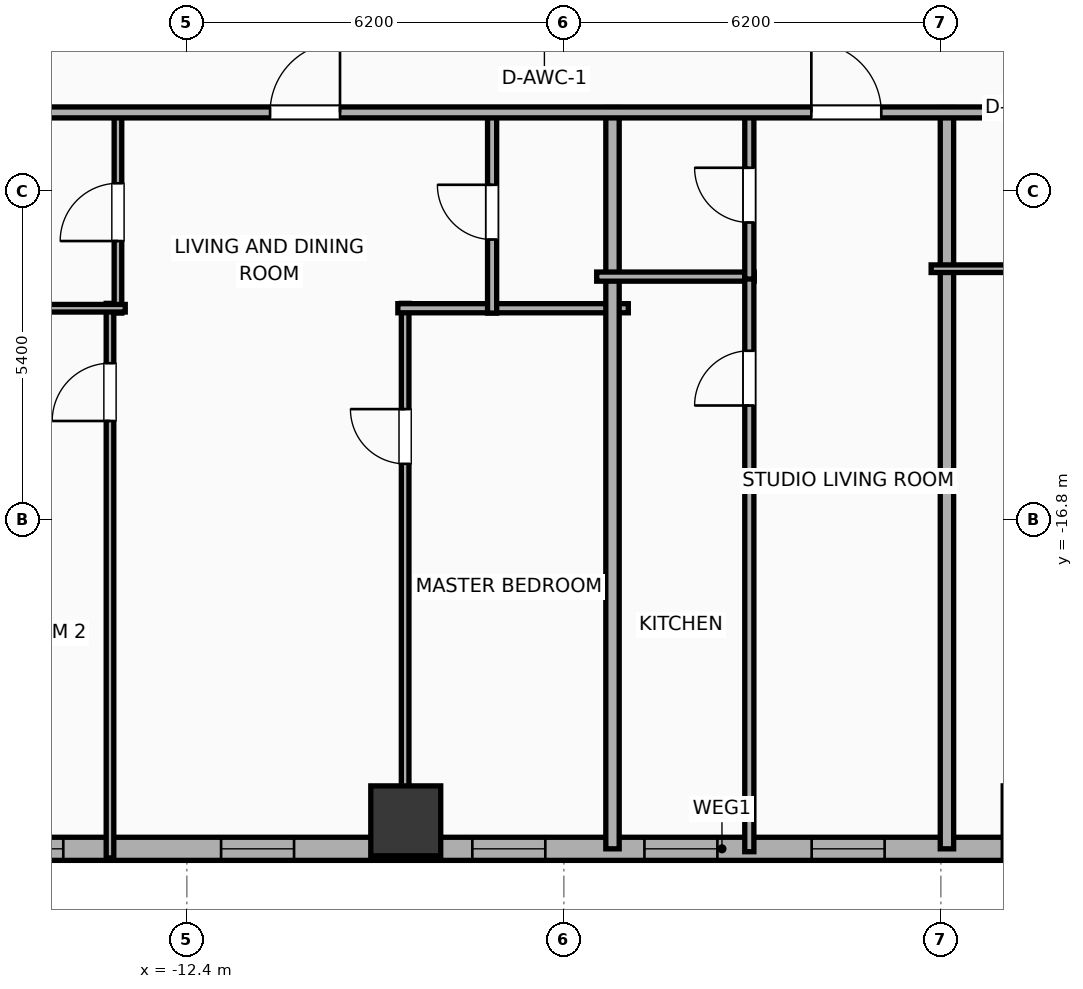
"""IFC4 building model, lengths in metres.
Left out: names, types, materials, properties, quantities, classifications, styles, units other than length and angle.
Written with IfcOpenShell. Run it as: python <this file> out.ifc"""

import sys

from ifc_helpers import new_model, si_unit, direction, frame, frame_2d, origin, origin_2d, place, context, subcontext, project, spatial, rectangle, hollow_rectangle, extrude, element, fill, save


model = new_model("IFC4")
c1 = context("Model", 3, precision=1e-05, world=origin(), true_north=direction((0.0, 1.0)))
c2 = subcontext(c1, "Body", "Model", "MODEL_VIEW")
j1 = project(units=[si_unit("LENGTHUNIT", "METRE"), si_unit("PLANEANGLEUNIT", "RADIAN")], contexts=[c1])
p1 = place(None, origin())
s1 = spatial("IfcSite", under=j1, at=p1, CompositionType="ELEMENT")
p2 = place(p1, origin())
s2 = spatial("IfcBuilding", under=s1, at=p2, CompositionType="ELEMENT")
p3 = place(p2, frame((0.0, 0.0, 37.7)))
s3 = spatial("IfcBuildingStorey", under=s2, at=p3, CompositionType="ELEMENT", Elevation=37.7)
for number, where, z_axis, x_axis in (
    (1, (-8.8, -21.75, 0.0), (0.0, 0.0, 1.0), (1.0, 0.0, 0.0)),
    (2, (1.6, -21.75, 0.0), (0.0, 0.0, 1.0), (1.0, 0.0, 0.0)),
):
    element("IfcColumn", number, at=place(p3, frame(where, z_axis=z_axis, x_axis=x_axis)), inside=s3, PredefinedType="COLUMN", context=c2, shape_type="SweptSolid", body=[
        extrude(hollow_rectangle(XDim=1.15, YDim=1.15, WallThickness=0.04, at=origin_2d()), origin(), (0.0, 0.0, 1.0), 3.9),
    ])
p4 = place(p3, frame((22.381, -22.21, 0.0), z_axis=(0.0, 0.0, 1.0), x_axis=(-1.0, 0.0, 0.0)))
e3 = element("IfcWall", 3, at=p4, inside=s3, PredefinedType="ELEMENTEDWALL", context=c2, shape_type="SweptSolid", body=[
    extrude(rectangle(XDim=51.963, YDim=0.38, at=frame_2d((25.981, 0.0))), origin(), (0.0, 0.0, 1.0), 3.65),
])
p5 = place(p4, frame((42.952, 0.0, 0.75)))
e4 = element("IfcOpeningElement", 4, at=p5, cuts=e3, PredefinedType="OPENING", context=c2, shape_type="SweptSolid", body=[
    extrude(rectangle(XDim=2.4, YDim=2.1, at=frame_2d((1.2, 1.05))), frame((0.0, 0.2, 0.0), z_axis=(0.0, -1.0, 0.0), x_axis=(1.0, 0.0, 0.0)), (0.0, 0.0, 1.0), 0.4),
])
p6 = place(p4, frame((49.847, 0.0, 0.75)))
e5 = element("IfcOpeningElement", 5, at=p6, cuts=e3, PredefinedType="OPENING", context=c2, shape_type="SweptSolid", body=[
    extrude(rectangle(XDim=1.2, YDim=2.05, at=frame_2d((0.6, 1.025))), frame((0.0, 0.2, 0.0), z_axis=(0.0, -1.0, 0.0), x_axis=(1.0, 0.0, 0.0)), (0.0, 0.0, 1.0), 0.4),
])
p7 = place(p4, frame((47.445, 0.0, 0.75)))
e6 = element("IfcOpeningElement", 6, at=p7, cuts=e3, PredefinedType="OPENING", context=c2, shape_type="SweptSolid", body=[
    extrude(rectangle(XDim=1.2, YDim=2.05, at=frame_2d((0.6, 1.025))), frame((0.0, 0.2, 0.0), z_axis=(0.0, -1.0, 0.0), x_axis=(1.0, 0.0, 0.0)), (0.0, 0.0, 1.0), 0.4),
])
p8 = place(p4, frame((39.526, 0.0, 0.75)))
e7 = element("IfcOpeningElement", 7, at=p8, cuts=e3, PredefinedType="OPENING", context=c2, shape_type="SweptSolid", body=[
    extrude(rectangle(XDim=1.2, YDim=2.05, at=frame_2d((0.6, 1.025))), frame((0.0, 0.2, 0.0), z_axis=(0.0, -1.0, 0.0), x_axis=(1.0, 0.0, 0.0)), (0.0, 0.0, 1.0), 0.4),
])
p9 = place(p4, frame((33.018, 0.0, 0.75)))
e8 = element("IfcOpeningElement", 8, at=p9, cuts=e3, PredefinedType="OPENING", context=c2, shape_type="SweptSolid", body=[
    extrude(rectangle(XDim=1.2, YDim=2.05, at=frame_2d((0.6, 1.025))), frame((0.0, 0.2, 0.0), z_axis=(0.0, -1.0, 0.0), x_axis=(1.0, 0.0, 0.0)), (0.0, 0.0, 1.0), 0.4),
])
p10 = place(p4, frame((36.813, 0.0, 0.75)))
e9 = element("IfcOpeningElement", 9, at=p10, cuts=e3, PredefinedType="OPENING", context=c2, shape_type="SweptSolid", body=[
    extrude(rectangle(XDim=1.2, YDim=2.05, at=frame_2d((0.6, 1.025))), frame((0.0, 0.2, 0.0), z_axis=(0.0, -1.0, 0.0), x_axis=(1.0, 0.0, 0.0)), (0.0, 0.0, 1.0), 0.4),
])
p11 = place(p4, frame((28.886, 0.0, 0.75)))
e10 = element("IfcOpeningElement", 10, at=p11, cuts=e3, PredefinedType="OPENING", context=c2, shape_type="SweptSolid", body=[
    extrude(rectangle(XDim=1.2, YDim=2.05, at=frame_2d((0.6, 1.025))), frame((0.0, 0.2, 0.0), z_axis=(0.0, -1.0, 0.0), x_axis=(1.0, 0.0, 0.0)), (0.0, 0.0, 1.0), 0.4),
])
p12 = place(p4, frame((23.306, 0.0, 0.75)))
e11 = element("IfcOpeningElement", 11, at=p12, cuts=e3, PredefinedType="OPENING", context=c2, shape_type="SweptSolid", body=[
    extrude(rectangle(XDim=1.2, YDim=2.05, at=frame_2d((0.6, 1.025))), frame((0.0, 0.2, 0.0), z_axis=(0.0, -1.0, 0.0), x_axis=(1.0, 0.0, 0.0)), (0.0, 0.0, 1.0), 0.4),
])
p13 = place(p4, frame((26.056, 0.0, 0.75)))
e12 = element("IfcOpeningElement", 12, at=p13, cuts=e3, PredefinedType="OPENING", context=c2, shape_type="SweptSolid", body=[
    extrude(rectangle(XDim=1.2, YDim=2.05, at=frame_2d((0.6, 1.025))), frame((0.0, 0.2, 0.0), z_axis=(0.0, -1.0, 0.0), x_axis=(1.0, 0.0, 0.0)), (0.0, 0.0, 1.0), 0.4),
])
p14 = place(p4, frame((18.811, 0.0, 0.75)))
e13 = element("IfcOpeningElement", 13, at=p14, cuts=e3, PredefinedType="OPENING", context=c2, shape_type="SweptSolid", body=[
    extrude(rectangle(XDim=1.2, YDim=2.05, at=frame_2d((0.6, 1.025))), frame((0.0, 0.2, 0.0), z_axis=(0.0, -1.0, 0.0), x_axis=(1.0, 0.0, 0.0)), (0.0, 0.0, 1.0), 0.4),
])
p15 = place(p4, frame((14.602, 0.0, 0.75)))
e14 = element("IfcOpeningElement", 14, at=p15, cuts=e3, PredefinedType="OPENING", context=c2, shape_type="SweptSolid", body=[
    extrude(rectangle(XDim=1.2, YDim=2.05, at=frame_2d((0.6, 1.025))), frame((0.0, 0.2, 0.0), z_axis=(0.0, -1.0, 0.0), x_axis=(1.0, 0.0, 0.0)), (0.0, 0.0, 1.0), 0.4),
])
p16 = place(p4, frame((11.852, 0.0, 0.75)))
e15 = element("IfcOpeningElement", 15, at=p16, cuts=e3, PredefinedType="OPENING", context=c2, shape_type="SweptSolid", body=[
    extrude(rectangle(XDim=1.2, YDim=2.05, at=frame_2d((0.6, 1.025))), frame((0.0, 0.2, 0.0), z_axis=(0.0, -1.0, 0.0), x_axis=(1.0, 0.0, 0.0)), (0.0, 0.0, 1.0), 0.4),
])
p17 = place(p4, frame((8.316, 0.0, 0.75)))
e16 = element("IfcOpeningElement", 16, at=p17, cuts=e3, PredefinedType="OPENING", context=c2, shape_type="SweptSolid", body=[
    extrude(rectangle(XDim=1.2, YDim=2.05, at=frame_2d((0.6, 1.025))), frame((0.0, 0.2, 0.0), z_axis=(0.0, -1.0, 0.0), x_axis=(1.0, 0.0, 0.0)), (0.0, 0.0, 1.0), 0.4),
])
p18 = place(p4, frame((6.286, 0.0, 0.75)))
e17 = element("IfcOpeningElement", 17, at=p18, cuts=e3, PredefinedType="OPENING", context=c2, shape_type="SweptSolid", body=[
    extrude(rectangle(XDim=1.2, YDim=2.05, at=frame_2d((0.6, 1.025))), frame((0.0, 0.2, 0.0), z_axis=(0.0, -1.0, 0.0), x_axis=(1.0, 0.0, 0.0)), (0.0, 0.0, 1.0), 0.4),
])
p19 = place(p4, frame((3.737, 0.0, 0.75)))
e18 = element("IfcOpeningElement", 18, at=p19, cuts=e3, PredefinedType="OPENING", context=c2, shape_type="SweptSolid", body=[
    extrude(rectangle(XDim=1.2, YDim=2.05, at=frame_2d((0.6, 1.025))), frame((0.0, 0.2, 0.0), z_axis=(0.0, -1.0, 0.0), x_axis=(1.0, 0.0, 0.0)), (0.0, 0.0, 1.0), 0.4),
])
p20 = place(p4, frame((1.291, 0.0, 0.75)))
e19 = element("IfcOpeningElement", 19, at=p20, cuts=e3, PredefinedType="OPENING", context=c2, shape_type="SweptSolid", body=[
    extrude(rectangle(XDim=1.2, YDim=2.05, at=frame_2d((0.6, 1.025))), frame((0.0, 0.2, 0.0), z_axis=(0.0, -1.0, 0.0), x_axis=(1.0, 0.0, 0.0)), (0.0, 0.0, 1.0), 0.4),
])
p21 = place(p3, frame((-13.664, -22.36, 0.0), z_axis=(0.0, 0.0, 1.0), x_axis=(0.0, 1.0, 0.0)))
e20 = element("IfcWall", 20, at=p21, inside=s3, PredefinedType="PARTITIONING", context=c2, shape_type="SweptSolid", body=[
    extrude(rectangle(XDim=9.12, YDim=0.125, at=frame_2d((4.56, 0.0))), origin(), (0.0, 0.0, 1.0), 3.65),
])
p22 = place(p21, frame((7.186, 0.0, 0.0)))
e21 = element("IfcOpeningElement", 21, at=p22, cuts=e20, PredefinedType="OPENING", context=c2, shape_type="SweptSolid", body=[
    extrude(rectangle(XDim=0.95, YDim=2.05, at=frame_2d((0.475, 1.025))), frame((0.0, 0.073, 0.0), z_axis=(0.0, -1.0, 0.0), x_axis=(1.0, 0.0, 0.0)), (0.0, 0.0, 1.0), 0.145),
])
p23 = place(p3, frame((-8.81, -22.36, 0.0), z_axis=(0.0, 0.0, 1.0), x_axis=(0.0, 1.0, 0.0)))
e22 = element("IfcWall", 22, at=p23, inside=s3, PredefinedType="PARTITIONING", context=c2, shape_type="SweptSolid", body=[
    extrude(rectangle(XDim=9.12, YDim=0.125, at=frame_2d((4.56, 0.0))), origin(), (0.0, 0.0, 1.0), 2.94),
])
p24 = place(p23, frame((6.481, 0.0, 0.0)))
e23 = element("IfcOpeningElement", 23, at=p24, cuts=e22, PredefinedType="OPENING", context=c2, shape_type="SweptSolid", body=[
    extrude(rectangle(XDim=0.9, YDim=2.05, at=frame_2d((0.45, 1.025))), frame((0.0, 0.073, 0.0), z_axis=(0.0, -1.0, 0.0), x_axis=(1.0, 0.0, 0.0)), (0.0, 0.0, 1.0), 0.145),
])
p25 = place(p3, frame((-8.93, -13.32, 0.0), z_axis=(0.0, 0.0, 1.0), x_axis=(1.0, 0.0, 0.0)))
e24 = element("IfcWall", 24, at=p25, inside=s3, PredefinedType="PLUMBINGWALL", context=c2, shape_type="SweptSolid", body=[
    extrude(rectangle(XDim=3.79, YDim=0.15, at=frame_2d((1.895, 0.0))), origin(), (0.0, 0.0, 1.0), 3.65),
])
p26 = place(p3, frame((-13.533, -13.4, 0.0), z_axis=(0.0, 0.0, 1.0), x_axis=(0.0, 1.0, 0.0)))
e25 = element("IfcWall", 25, at=p26, inside=s3, PredefinedType="PARTITIONING", context=c2, shape_type="SweptSolid", body=[
    extrude(rectangle(XDim=3.32, YDim=0.125, at=frame_2d((1.66, 0.0))), origin(), (0.0, 0.0, 1.0), 3.65),
])
p27 = place(p26, frame((1.185, 0.0, 0.0)))
e26 = element("IfcOpeningElement", 26, at=p27, cuts=e25, PredefinedType="OPENING", context=c2, shape_type="SweptSolid", body=[
    extrude(rectangle(XDim=0.95, YDim=2.05, at=frame_2d((0.475, 1.025))), frame((0.0, 0.073, 0.0), z_axis=(0.0, -1.0, 0.0), x_axis=(1.0, 0.0, 0.0)), (0.0, 0.0, 1.0), 0.145),
])
p28 = place(p3, frame((-16.475, -13.32, 0.0), z_axis=(0.0, 0.0, 1.0), x_axis=(1.0, 0.0, 0.0)))
e27 = element("IfcWall", 27, at=p28, inside=s3, PredefinedType="PARTITIONING", context=c2, shape_type="SweptSolid", body=[
    extrude(rectangle(XDim=3.062, YDim=0.125, at=frame_2d((1.531, 0.0))), origin(), (0.0, 0.0, 1.0), 3.65),
])
p29 = place(p3, frame((-7.38, -13.4, 0.0), z_axis=(0.0, 0.0, 1.0), x_axis=(0.0, 1.0, 0.0)))
e28 = element("IfcWall", 28, at=p29, inside=s3, PredefinedType="PLUMBINGWALL", context=c2, shape_type="SweptSolid", body=[
    extrude(rectangle(XDim=3.32, YDim=0.15, at=frame_2d((1.66, 0.0))), origin(), (0.0, 0.0, 1.0), 3.65),
])
p30 = place(p29, frame((1.21, 0.0, 0.0)))
e29 = element("IfcOpeningElement", 29, at=p30, cuts=e28, PredefinedType="OPENING", context=c2, shape_type="SweptSolid", body=[
    extrude(rectangle(XDim=0.9, YDim=2.05, at=frame_2d((0.45, 1.025))), frame((0.0, 0.085, 0.0), z_axis=(0.0, -1.0, 0.0), x_axis=(1.0, 0.0, 0.0)), (0.0, 0.0, 1.0), 0.17),
])
p31 = place(p3, frame((-5.4, -22.21, 0.0), z_axis=(0.0, 0.0, 1.0), x_axis=(0.0, 1.0, 0.0)))
e30 = element("IfcWall", 30, at=p31, inside=s3, PredefinedType="PARTITIONING", context=c2, shape_type="SweptSolid", body=[
    extrude(rectangle(XDim=12.19, YDim=0.22, at=frame_2d((6.095, 0.0))), origin(), (0.0, 0.0, 1.0), 3.65),
])
p32 = place(p3, frame((-5.66, -12.8, 0.0), z_axis=(0.0, 0.0, 1.0), x_axis=(1.0, 0.0, 0.0)))
e31 = element("IfcWall", 31, at=p32, inside=s3, PredefinedType="PLUMBINGWALL", context=c2, shape_type="SweptSolid", body=[
    extrude(rectangle(XDim=2.59, YDim=0.15, at=frame_2d((1.295, 0.0))), origin(), (0.0, 0.0, 1.0), 3.65),
])
p33 = place(p3, frame((-3.15, -22.258, 0.0), z_axis=(0.0, 0.0, 1.0), x_axis=(0.0, 1.0, 0.0)))
e32 = element("IfcWall", 32, at=p33, inside=s3, PredefinedType="PLUMBINGWALL", context=c2, shape_type="SweptSolid", body=[
    extrude(rectangle(XDim=9.498, YDim=0.15, at=frame_2d((4.749, 0.0))), origin(), (0.0, 0.0, 1.0), 3.65),
])
p34 = place(p33, frame((7.338, 0.0, 0.0)))
e33 = element("IfcOpeningElement", 33, at=p34, cuts=e32, PredefinedType="OPENING", context=c2, shape_type="SweptSolid", body=[
    extrude(rectangle(XDim=0.9, YDim=2.05, at=frame_2d((0.45, 1.025))), frame((0.0, 0.085, 0.0), z_axis=(0.0, -1.0, 0.0), x_axis=(1.0, 0.0, 0.0)), (0.0, 0.0, 1.0), 0.17),
])
p35 = place(p3, frame((-3.15, -12.84, 0.0), z_axis=(0.0, 0.0, 1.0), x_axis=(0.0, 1.0, 0.0)))
e34 = element("IfcWall", 34, at=p35, inside=s3, PredefinedType="PLUMBINGWALL", context=c2, shape_type="SweptSolid", body=[
    extrude(rectangle(XDim=2.76, YDim=0.15, at=frame_2d((1.38, 0.0))), origin(), (0.0, 0.0, 1.0), 3.65),
])
p36 = place(p35, frame((0.93, 0.0, 0.0)))
e35 = element("IfcOpeningElement", 35, at=p36, cuts=e34, PredefinedType="OPENING", context=c2, shape_type="SweptSolid", body=[
    extrude(rectangle(XDim=0.9, YDim=2.05, at=frame_2d((0.45, 1.025))), frame((0.0, 0.085, 0.0), z_axis=(0.0, -1.0, 0.0), x_axis=(1.0, 0.0, 0.0)), (0.0, 0.0, 1.0), 0.17),
])
p37 = place(p3, frame((0.1, -22.21, 0.0), z_axis=(0.0, 0.0, 1.0), x_axis=(0.0, 1.0, 0.0)))
e36 = element("IfcWall", 36, at=p37, inside=s3, PredefinedType="PARTITIONING", context=c2, shape_type="SweptSolid", body=[
    extrude(rectangle(XDim=12.19, YDim=0.22, at=frame_2d((6.095, 0.0))), origin(), (0.0, 0.0, 1.0), 3.65),
])
p38 = place(p3, frame((-0.16, -12.67, 0.0), z_axis=(0.0, 0.0, 1.0), x_axis=(1.0, 0.0, 0.0)))
e37 = element("IfcWall", 37, at=p38, inside=s3, PredefinedType="PARTITIONING", context=c2, shape_type="SweptSolid", body=[
    extrude(rectangle(XDim=2.63, YDim=0.125, at=frame_2d((1.315, 0.0))), origin(), (0.0, 0.0, 1.0), 3.65),
])
p39 = place(p3, frame((-33.41, -10.1, 0.0), z_axis=(0.0, 0.0, 1.0), x_axis=(1.0, 0.0, 0.0)))
e38 = element("IfcWall", 38, at=p39, inside=s3, PredefinedType="PARTITIONING", context=c2, shape_type="SweptSolid", body=[
    extrude(rectangle(XDim=59.62, YDim=0.18, at=frame_2d((29.81, 0.0))), origin(), (0.0, 0.0, 1.0), 3.65),
])
p40 = place(p39, frame((2.746, 0.0, 0.0)))
e39 = element("IfcOpeningElement", 39, at=p40, cuts=e38, PredefinedType="OPENING", context=c2, shape_type="SweptSolid", body=[
    extrude(rectangle(XDim=0.9, YDim=2.05, at=frame_2d((0.45, 1.025))), frame((0.0, 0.1, 0.0), z_axis=(0.0, -1.0, 0.0), x_axis=(1.0, 0.0, 0.0)), (0.0, 0.0, 1.0), 0.2),
])
p41 = place(p39, frame((11.552, 0.0, 0.0)))
e40 = element("IfcOpeningElement", 40, at=p41, cuts=e38, PredefinedType="OPENING", context=c2, shape_type="SweptSolid", body=[
    extrude(rectangle(XDim=1.15, YDim=2.05, at=frame_2d((0.575, 1.025))), frame((0.0, 0.1, 0.0), z_axis=(0.0, -1.0, 0.0), x_axis=(1.0, 0.0, 0.0)), (0.0, 0.0, 1.0), 0.2),
])
p42 = place(p39, frame((22.379, 0.0, 0.0)))
e41 = element("IfcOpeningElement", 41, at=p42, cuts=e38, PredefinedType="OPENING", context=c2, shape_type="SweptSolid", body=[
    extrude(rectangle(XDim=1.15, YDim=2.05, at=frame_2d((0.575, 1.025))), frame((0.0, 0.1, 0.0), z_axis=(0.0, -1.0, 0.0), x_axis=(1.0, 0.0, 0.0)), (0.0, 0.0, 1.0), 0.2),
])
p43 = place(p39, frame((31.28, 0.0, 0.0)))
e42 = element("IfcOpeningElement", 42, at=p43, cuts=e38, PredefinedType="OPENING", context=c2, shape_type="SweptSolid", body=[
    extrude(rectangle(XDim=1.15, YDim=2.05, at=frame_2d((0.575, 1.025))), frame((0.0, 0.1, 0.0), z_axis=(0.0, -1.0, 0.0), x_axis=(1.0, 0.0, 0.0)), (0.0, 0.0, 1.0), 0.2),
])
p44 = place(p39, frame((36.02, 0.0, 0.0)))
e43 = element("IfcOpeningElement", 43, at=p44, cuts=e38, PredefinedType="OPENING", context=c2, shape_type="SweptSolid", body=[
    extrude(rectangle(XDim=0.9, YDim=2.05, at=frame_2d((0.45, 1.025))), frame((0.0, 0.1, 0.0), z_axis=(0.0, -1.0, 0.0), x_axis=(1.0, 0.0, 0.0)), (0.0, 0.0, 1.0), 0.2),
])
p45 = place(p39, frame((40.044, 0.0, 0.0)))
e44 = element("IfcOpeningElement", 44, at=p45, cuts=e38, PredefinedType="OPENING", context=c2, shape_type="SweptSolid", body=[
    extrude(rectangle(XDim=1.15, YDim=2.05, at=frame_2d((0.575, 1.025))), frame((0.0, 0.1, 0.0), z_axis=(0.0, -1.0, 0.0), x_axis=(1.0, 0.0, 0.0)), (0.0, 0.0, 1.0), 0.2),
])
p46 = place(p39, frame((45.613, 0.0, 0.0)))
e45 = element("IfcOpeningElement", 45, at=p46, cuts=e38, PredefinedType="OPENING", context=c2, shape_type="SweptSolid", body=[
    extrude(rectangle(XDim=1.15, YDim=2.05, at=frame_2d((0.575, 1.025))), frame((0.0, 0.1, 0.0), z_axis=(0.0, -1.0, 0.0), x_axis=(1.0, 0.0, 0.0)), (0.0, 0.0, 1.0), 0.2),
])
p47 = place(p39, frame((54.174, 0.0, 0.0)))
e46 = element("IfcOpeningElement", 46, at=p47, cuts=e38, PredefinedType="OPENING", context=c2, shape_type="SweptSolid", body=[
    extrude(rectangle(XDim=1.15, YDim=2.05, at=frame_2d((0.575, 1.025))), frame((0.0, 0.1, 0.0), z_axis=(0.0, -1.0, 0.0), x_axis=(1.0, 0.0, 0.0)), (0.0, 0.0, 1.0), 0.2),
])
p48 = place(p9, origin())
e47 = element("IfcWindow", 47, at=p48, inside=s3, PartitioningType="SINGLE_PANEL", PredefinedType="WINDOW", context=c2, shape_type="SweptSolid", body=[
    extrude(rectangle(XDim=1.2, YDim=2.05, at=frame_2d((0.6, 1.025))), frame((0.0, 0.03, 0.0), z_axis=(0.0, -1.0, 0.0), x_axis=(1.0, 0.0, 0.0)), (0.0, 0.0, 1.0), 0.06),
])
fill(e8, e47)
p49 = place(p10, origin())
e48 = element("IfcWindow", 48, at=p49, inside=s3, PartitioningType="SINGLE_PANEL", PredefinedType="WINDOW", context=c2, shape_type="SweptSolid", body=[
    extrude(rectangle(XDim=1.2, YDim=2.05, at=frame_2d((0.6, 1.025))), frame((0.0, 0.03, 0.0), z_axis=(0.0, -1.0, 0.0), x_axis=(1.0, 0.0, 0.0)), (0.0, 0.0, 1.0), 0.06),
])
fill(e9, e48)
p50 = place(p11, origin())
e49 = element("IfcWindow", 49, at=p50, inside=s3, PartitioningType="SINGLE_PANEL", PredefinedType="WINDOW", context=c2, shape_type="SweptSolid", body=[
    extrude(rectangle(XDim=1.2, YDim=2.05, at=frame_2d((0.6, 1.025))), frame((0.0, 0.03, 0.0), z_axis=(0.0, -1.0, 0.0), x_axis=(1.0, 0.0, 0.0)), (0.0, 0.0, 1.0), 0.06),
])
fill(e10, e49)
p51 = place(p12, origin())
e50 = element("IfcWindow", 50, at=p51, inside=s3, PartitioningType="SINGLE_PANEL", PredefinedType="WINDOW", context=c2, shape_type="SweptSolid", body=[
    extrude(rectangle(XDim=1.2, YDim=2.05, at=frame_2d((0.6, 1.025))), frame((0.0, 0.03, 0.0), z_axis=(0.0, -1.0, 0.0), x_axis=(1.0, 0.0, 0.0)), (0.0, 0.0, 1.0), 0.06),
])
fill(e11, e50)
p52 = place(p13, origin())
e51 = element("IfcWindow", 51, at=p52, inside=s3, PartitioningType="SINGLE_PANEL", PredefinedType="WINDOW", context=c2, shape_type="SweptSolid", body=[
    extrude(rectangle(XDim=1.2, YDim=2.05, at=frame_2d((0.6, 1.025))), frame((0.0, 0.03, 0.0), z_axis=(0.0, -1.0, 0.0), x_axis=(1.0, 0.0, 0.0)), (0.0, 0.0, 1.0), 0.06),
])
fill(e12, e51)
p53 = place(p22, origin())
e52 = element("IfcDoor", 52, at=p53, inside=s3, OperationType="SINGLE_SWING_LEFT", PredefinedType="DOOR", context=c2, shape_type="SweptSolid", body=[
    extrude(rectangle(XDim=0.95, YDim=2.05, at=frame_2d((0.475, 1.025))), frame((0.0, 0.025, 0.0), z_axis=(0.0, -1.0, 0.0), x_axis=(1.0, 0.0, 0.0)), (0.0, 0.0, 1.0), 0.05),
])
fill(e21, e52)
p54 = place(p24, origin())
e53 = element("IfcDoor", 53, at=p54, inside=s3, OperationType="SINGLE_SWING_RIGHT", PredefinedType="DOOR", context=c2, shape_type="SweptSolid", body=[
    extrude(rectangle(XDim=0.9, YDim=2.05, at=frame_2d((0.45, 1.025))), frame((0.0, 0.025, 0.0), z_axis=(0.0, -1.0, 0.0), x_axis=(1.0, 0.0, 0.0)), (0.0, 0.0, 1.0), 0.05),
])
fill(e23, e53)
p55 = place(p27, origin())
e54 = element("IfcDoor", 54, at=p55, inside=s3, OperationType="SINGLE_SWING_LEFT", PredefinedType="DOOR", context=c2, shape_type="SweptSolid", body=[
    extrude(rectangle(XDim=0.95, YDim=2.05, at=frame_2d((0.475, 1.025))), frame((0.0, 0.025, 0.0), z_axis=(0.0, -1.0, 0.0), x_axis=(1.0, 0.0, 0.0)), (0.0, 0.0, 1.0), 0.05),
])
fill(e26, e54)
p56 = place(p30, origin())
e55 = element("IfcDoor", 55, at=p56, inside=s3, OperationType="SINGLE_SWING_RIGHT", PredefinedType="DOOR", context=c2, shape_type="SweptSolid", body=[
    extrude(rectangle(XDim=0.9, YDim=2.05, at=frame_2d((0.45, 1.025))), frame((0.0, 0.025, 0.0), z_axis=(0.0, -1.0, 0.0), x_axis=(1.0, 0.0, 0.0)), (0.0, 0.0, 1.0), 0.05),
])
fill(e29, e55)
p57 = place(p34, origin())
e56 = element("IfcDoor", 56, at=p57, inside=s3, OperationType="SINGLE_SWING_LEFT", PredefinedType="DOOR", context=c2, shape_type="SweptSolid", body=[
    extrude(rectangle(XDim=0.9, YDim=2.05, at=frame_2d((0.45, 1.025))), frame((0.0, 0.025, 0.0), z_axis=(0.0, -1.0, 0.0), x_axis=(1.0, 0.0, 0.0)), (0.0, 0.0, 1.0), 0.05),
])
fill(e33, e56)
p58 = place(p36, origin())
e57 = element("IfcDoor", 57, at=p58, inside=s3, OperationType="SINGLE_SWING_RIGHT", PredefinedType="DOOR", context=c2, shape_type="SweptSolid", body=[
    extrude(rectangle(XDim=0.9, YDim=2.05, at=frame_2d((0.45, 1.025))), frame((0.0, 0.025, 0.0), z_axis=(0.0, -1.0, 0.0), x_axis=(1.0, 0.0, 0.0)), (0.0, 0.0, 1.0), 0.05),
])
fill(e35, e57)
p59 = place(p42, origin())
e58 = element("IfcDoor", 58, at=p59, inside=s3, OperationType="SINGLE_SWING_RIGHT", PredefinedType="DOOR", context=c2, shape_type="SweptSolid", body=[
    extrude(rectangle(XDim=1.15, YDim=2.05, at=frame_2d((0.575, 1.025))), frame((0.0, 0.025, 0.0), z_axis=(0.0, -1.0, 0.0), x_axis=(1.0, 0.0, 0.0)), (0.0, 0.0, 1.0), 0.05),
])
fill(e41, e58)
p60 = place(p43, origin())
e59 = element("IfcDoor", 59, at=p60, inside=s3, OperationType="SINGLE_SWING_LEFT", PredefinedType="DOOR", context=c2, shape_type="SweptSolid", body=[
    extrude(rectangle(XDim=1.15, YDim=2.05, at=frame_2d((0.575, 1.025))), frame((0.0, 0.025, 0.0), z_axis=(0.0, -1.0, 0.0), x_axis=(1.0, 0.0, 0.0)), (0.0, 0.0, 1.0), 0.05),
])
fill(e42, e59)
save(model, sys.argv[1])
